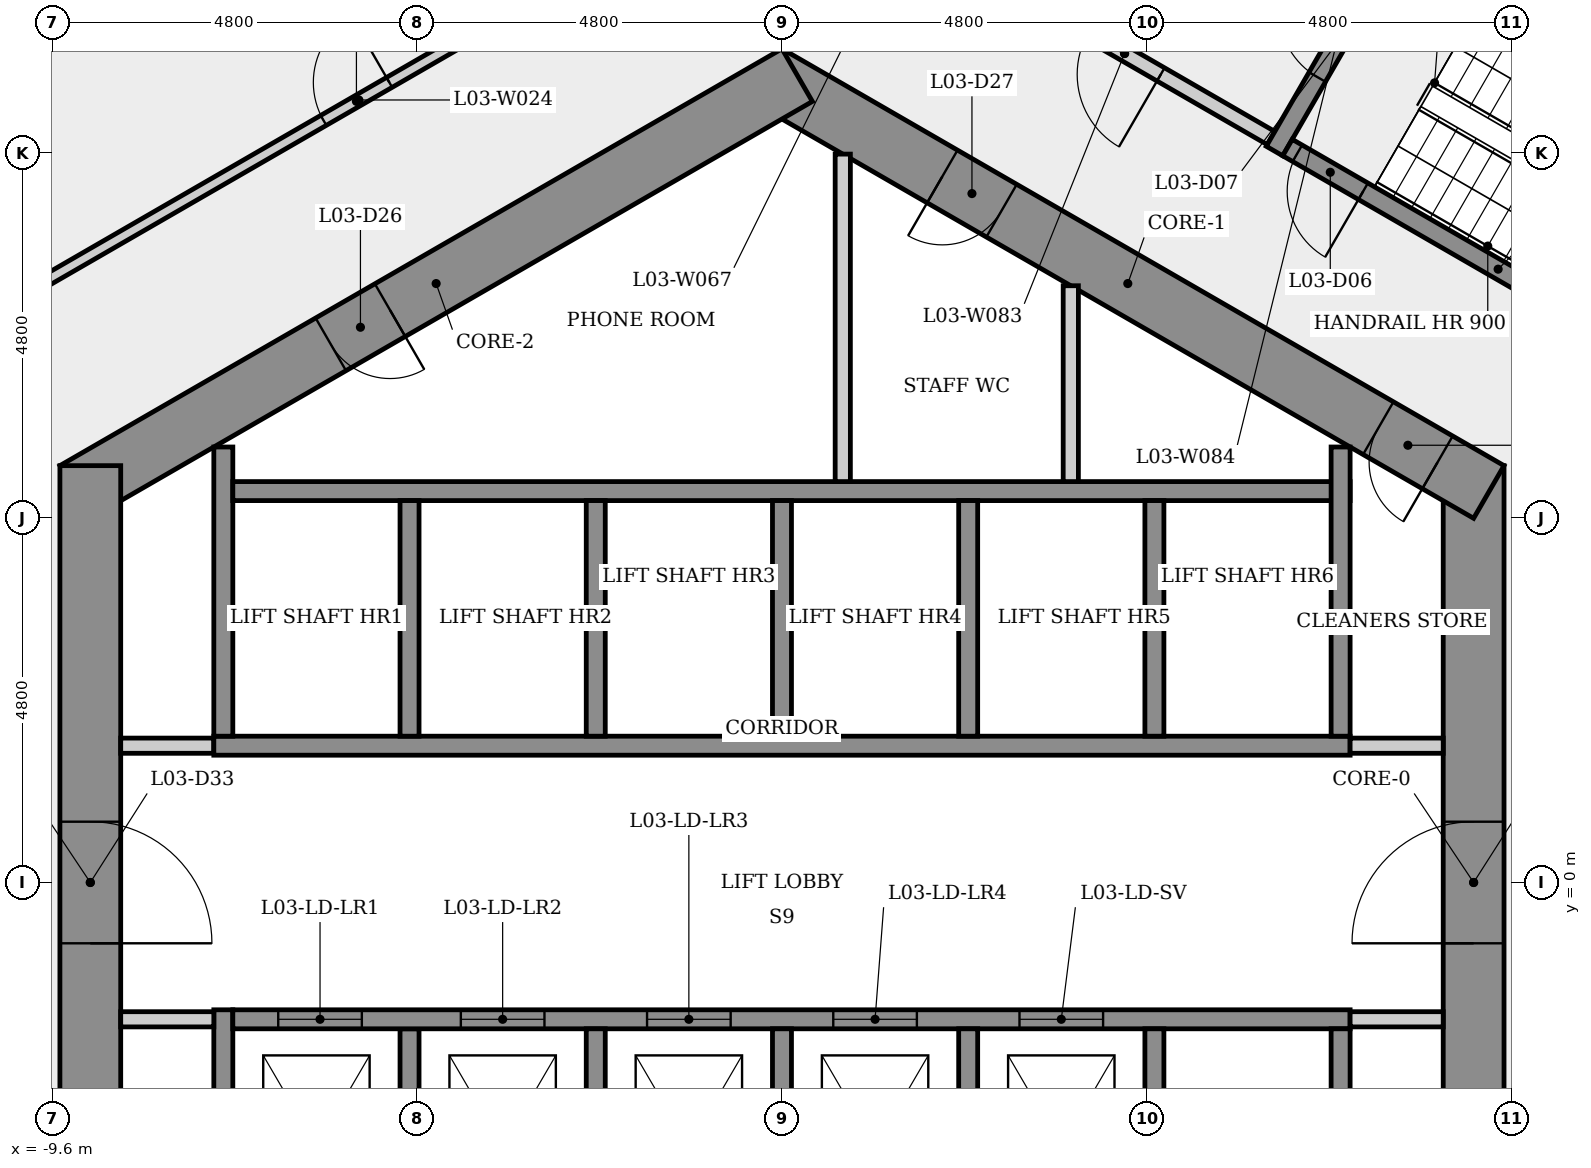
"""IFC4 building model, lengths in metres.
Left out: names, types, materials, properties, quantities, classifications, styles, units other than length and angle.
Written with IfcOpenShell. Run it as: python <this file> out.ifc"""

import sys

from ifc_helpers import new_model, si_unit, direction, frame, frame_2d, origin, place, context, subcontext, project, spatial, rectangle, extrude, element, fill, save


model = new_model("IFC4")
c1 = context("Model", 3, precision=1e-05, world=origin(), true_north=direction((0.0, 1.0)))
c2 = subcontext(c1, "Body", "Model", "MODEL_VIEW")
j1 = project(units=[si_unit("LENGTHUNIT", "METRE"), si_unit("PLANEANGLEUNIT", "RADIAN")], contexts=[c1])
p1 = place(None, origin())
s1 = spatial("IfcSite", under=j1, at=p1, CompositionType="ELEMENT")
p2 = place(p1, origin())
s2 = spatial("IfcBuilding", under=s1, at=p2, CompositionType="ELEMENT")
p3 = place(p2, frame((0.0, 0.0, 16.0)))
s3 = spatial("IfcBuildingStorey", under=s2, at=p3, CompositionType="ELEMENT", Elevation=16.0)
p4 = place(p3, frame((9.1, -5.485, 0.0), z_axis=(0.0, 0.0, 1.0), x_axis=(0.0, 1.0, 0.0)))
e1 = element("IfcWall", 1, at=p4, inside=s3, PredefinedType="SHEAR", context=c2, shape_type="SweptSolid", body=[
    extrude(rectangle(XDim=10.97, YDim=0.8, at=frame_2d((5.485, 0.0))), origin(), (0.0, 0.0, 1.0), 4.5),
])
p5 = place(p4, frame((4.685, 0.0, 0.0)))
e2 = element("IfcOpeningElement", 2, at=p5, cuts=e1, PredefinedType="OPENING", context=c2, shape_type="SweptSolid", body=[
    extrude(rectangle(XDim=1.6, YDim=2.1, at=frame_2d((0.8, 1.05))), frame((0.0, 0.41, 0.0), z_axis=(0.0, -1.0, 0.0), x_axis=(1.0, 0.0, 0.0)), (0.0, 0.0, 1.0), 0.82),
])
p6 = place(p3, frame((9.3, 5.138, 0.0), z_axis=(0.0, 0.0, 1.0), x_axis=(-0.866023993627, 0.500002442456, 0.0)))
e3 = element("IfcWall", 3, at=p6, inside=s3, PredefinedType="SHEAR", context=c2, shape_type="SweptSolid", body=[
    extrude(rectangle(XDim=10.97, YDim=0.8, at=frame_2d((5.485, 0.0))), origin(), (0.0, 0.0, 1.0), 4.5),
])
p7 = place(p6, frame((7.403, 0.0, 0.0)))
e4 = element("IfcOpeningElement", 4, at=p7, cuts=e3, PredefinedType="OPENING", context=c2, shape_type="SweptSolid", body=[
    extrude(rectangle(XDim=0.9, YDim=2.1, at=frame_2d((0.45, 1.05))), frame((0.0, 0.41, 0.0), z_axis=(0.0, -1.0, 0.0), x_axis=(1.0, 0.0, 0.0)), (0.0, 0.0, 1.0), 0.82),
])
p8 = place(p6, frame((0.78, 0.0, 0.0)))
e5 = element("IfcOpeningElement", 5, at=p8, cuts=e3, PredefinedType="OPENING", context=c2, shape_type="SweptSolid", body=[
    extrude(rectangle(XDim=0.9, YDim=2.1, at=frame_2d((0.45, 1.05))), frame((0.0, 0.41, 0.0), z_axis=(0.0, -1.0, 0.0), x_axis=(1.0, 0.0, 0.0)), (0.0, 0.0, 1.0), 0.82),
])
p9 = place(p3, frame((0.2, 10.623, 0.0), z_axis=(0.0, 0.0, 1.0), x_axis=(-0.866023993627, -0.500002442456, 0.0)))
e6 = element("IfcWall", 6, at=p9, inside=s3, PredefinedType="SHEAR", context=c2, shape_type="SweptSolid", body=[
    extrude(rectangle(XDim=10.97, YDim=0.8, at=frame_2d((5.485, 0.0))), origin(), (0.0, 0.0, 1.0), 4.5),
])
p10 = place(p9, frame((6.185, 0.0, 0.0)))
e7 = element("IfcOpeningElement", 7, at=p10, cuts=e6, PredefinedType="OPENING", context=c2, shape_type="SweptSolid", body=[
    extrude(rectangle(XDim=0.9, YDim=2.1, at=frame_2d((0.45, 1.05))), frame((0.0, 0.41, 0.0), z_axis=(0.0, -1.0, 0.0), x_axis=(1.0, 0.0, 0.0)), (0.0, 0.0, 1.0), 0.82),
])
p11 = place(p3, frame((-9.1, 5.485, 0.0), z_axis=(0.0, 0.0, 1.0), x_axis=(0.0, -1.0, 0.0)))
e8 = element("IfcWall", 8, at=p11, inside=s3, PredefinedType="SHEAR", context=c2, shape_type="SweptSolid", body=[
    extrude(rectangle(XDim=10.97, YDim=0.8, at=frame_2d((5.485, 0.0))), origin(), (0.0, 0.0, 1.0), 4.5),
])
p12 = place(p11, frame((4.685, 0.0, 0.0)))
e9 = element("IfcOpeningElement", 9, at=p12, cuts=e8, PredefinedType="OPENING", context=c2, shape_type="SweptSolid", body=[
    extrude(rectangle(XDim=1.6, YDim=2.1, at=frame_2d((0.8, 1.05))), frame((0.0, 0.41, 0.0), z_axis=(0.0, -1.0, 0.0), x_axis=(1.0, 0.0, 0.0)), (0.0, 0.0, 1.0), 0.82),
])
p13 = place(p3, frame((-10.598, 7.391, 0.0), z_axis=(0.0, 0.0, 1.0), x_axis=(0.866022183431, 0.500005577774, 0.0)))
e10 = element("IfcWall", 10, at=p13, inside=s3, PredefinedType="PARTITIONING", context=c2, shape_type="SweptSolid", body=[
    extrude(rectangle(XDim=11.619, YDim=0.15, at=frame_2d((5.81, 0.0))), origin(), (0.0, 0.0, 1.0), 4.05),
])
p14 = place(p13, frame((5.272, 0.0, 0.0)))
e11 = element("IfcOpeningElement", 11, at=p14, cuts=e10, PredefinedType="OPENING", context=c2, shape_type="SweptSolid", body=[
    extrude(rectangle(XDim=1.0, YDim=2.1, at=frame_2d((0.5, 1.05))), frame((0.0, 0.085, 0.0), z_axis=(0.0, -1.0, 0.0), x_axis=(1.0, 0.0, 0.0)), (0.0, 0.0, 1.0), 0.17),
])
p15 = place(p3, frame((-8.7, 1.8, 0.0), z_axis=(0.0, 0.0, 1.0), x_axis=(1.0, 0.0, 0.0)))
e12 = element("IfcWall", 12, at=p15, inside=s3, PredefinedType="PARTITIONING", context=c2, shape_type="SweptSolid", body=[
    extrude(rectangle(XDim=1.225, YDim=0.2, at=frame_2d((0.613, 0.0))), origin(), (0.0, 0.0, 1.0), 4.05),
])
p16 = place(p3, frame((-7.475, 1.8, 0.0), z_axis=(0.0, 0.0, 1.0), x_axis=(1.0, 0.0, 0.0)))
e13 = element("IfcWall", 13, at=p16, inside=s3, PredefinedType="SHEAR", context=c2, shape_type="SweptSolid", body=[
    extrude(rectangle(XDim=14.95, YDim=0.25, at=frame_2d((7.475, 0.0))), origin(), (0.0, 0.0, 1.0), 4.05),
])
p17 = place(p3, frame((-7.35, -5.73, 0.0), z_axis=(0.0, 0.0, 1.0), x_axis=(0.0, 1.0, 0.0)))
e14 = element("IfcWall", 14, at=p17, inside=s3, PredefinedType="SHEAR", context=c2, shape_type="SweptSolid", body=[
    extrude(rectangle(XDim=4.055, YDim=0.25, at=frame_2d((2.028, 0.0))), origin(), (0.0, 0.0, 1.0), 4.05),
])
p18 = place(p3, frame((-7.35, 1.925, 0.0), z_axis=(0.0, 0.0, 1.0), x_axis=(0.0, 1.0, 0.0)))
e15 = element("IfcWall", 15, at=p18, inside=s3, PredefinedType="SHEAR", context=c2, shape_type="SweptSolid", body=[
    extrude(rectangle(XDim=3.805, YDim=0.25, at=frame_2d((1.903, 0.0))), origin(), (0.0, 0.0, 1.0), 4.05),
])
p19 = place(p3, frame((-7.225, 5.15, 0.0), z_axis=(0.0, 0.0, 1.0), x_axis=(1.0, 0.0, 0.0)))
e16 = element("IfcWall", 16, at=p19, inside=s3, PredefinedType="SHEAR", context=c2, shape_type="SweptSolid", body=[
    extrude(rectangle(XDim=14.7, YDim=0.25, at=frame_2d((7.35, 0.0))), origin(), (0.0, 0.0, 1.0), 4.05),
])
p20 = place(p3, frame((-7.475, -1.8, 0.0), z_axis=(0.0, 0.0, 1.0), x_axis=(-1.0, 0.0, 0.0)))
e17 = element("IfcWall", 17, at=p20, inside=s3, PredefinedType="PARTITIONING", context=c2, shape_type="SweptSolid", body=[
    extrude(rectangle(XDim=1.225, YDim=0.2, at=frame_2d((0.613, 0.0))), origin(), (0.0, 0.0, 1.0), 4.05),
])
for number, where, z_axis, x_axis in (
    (18, (-4.9, -1.925, 0.0), (0.0, 0.0, 1.0), (0.0, -1.0, 0.0)),
    (19, (-4.9, 5.025, 0.0), (0.0, 0.0, 1.0), (0.0, -1.0, 0.0)),
):
    element("IfcWall", number, at=place(p3, frame(where, z_axis=z_axis, x_axis=x_axis)), inside=s3, PredefinedType="SHEAR", context=c2, shape_type="SweptSolid", body=[
        extrude(rectangle(XDim=3.1, YDim=0.25, at=frame_2d((1.55, 0.0))), origin(), (0.0, 0.0, 1.0), 4.5),
    ])
p21 = place(p3, frame((-7.225, -1.8, 0.0), z_axis=(0.0, 0.0, 1.0), x_axis=(1.0, 0.0, 0.0)))
e20 = element("IfcWall", 20, at=p21, inside=s3, PredefinedType="SHEAR", context=c2, shape_type="SweptSolid", body=[
    extrude(rectangle(XDim=14.7, YDim=0.25, at=frame_2d((7.35, 0.0))), origin(), (0.0, 0.0, 1.0), 4.05),
])
p22 = place(p21, frame((0.597, 0.0, 0.0)))
e21 = element("IfcOpeningElement", 21, at=p22, cuts=e20, PredefinedType="OPENING", context=c2, shape_type="SweptSolid", body=[
    extrude(rectangle(XDim=1.1, YDim=2.1, at=frame_2d((0.55, 1.05))), frame((0.0, 0.135, 0.0), z_axis=(0.0, -1.0, 0.0), x_axis=(1.0, 0.0, 0.0)), (0.0, 0.0, 1.0), 0.27),
])
p23 = place(p21, frame((3.0, 0.0, 0.0)))
e22 = element("IfcOpeningElement", 22, at=p23, cuts=e20, PredefinedType="OPENING", context=c2, shape_type="SweptSolid", body=[
    extrude(rectangle(XDim=1.1, YDim=2.1, at=frame_2d((0.55, 1.05))), frame((0.0, 0.135, 0.0), z_axis=(0.0, -1.0, 0.0), x_axis=(1.0, 0.0, 0.0)), (0.0, 0.0, 1.0), 0.27),
])
p24 = place(p21, frame((5.45, 0.0, 0.0)))
e23 = element("IfcOpeningElement", 23, at=p24, cuts=e20, PredefinedType="OPENING", context=c2, shape_type="SweptSolid", body=[
    extrude(rectangle(XDim=1.1, YDim=2.1, at=frame_2d((0.55, 1.05))), frame((0.0, 0.135, 0.0), z_axis=(0.0, -1.0, 0.0), x_axis=(1.0, 0.0, 0.0)), (0.0, 0.0, 1.0), 0.27),
])
p25 = place(p21, frame((7.9, 0.0, 0.0)))
e24 = element("IfcOpeningElement", 24, at=p25, cuts=e20, PredefinedType="OPENING", context=c2, shape_type="SweptSolid", body=[
    extrude(rectangle(XDim=1.1, YDim=2.1, at=frame_2d((0.55, 1.05))), frame((0.0, 0.135, 0.0), z_axis=(0.0, -1.0, 0.0), x_axis=(1.0, 0.0, 0.0)), (0.0, 0.0, 1.0), 0.27),
])
p26 = place(p21, frame((10.35, 0.0, 0.0)))
e25 = element("IfcOpeningElement", 25, at=p26, cuts=e20, PredefinedType="OPENING", context=c2, shape_type="SweptSolid", body=[
    extrude(rectangle(XDim=1.1, YDim=2.1, at=frame_2d((0.55, 1.05))), frame((0.0, 0.135, 0.0), z_axis=(0.0, -1.0, 0.0), x_axis=(1.0, 0.0, 0.0)), (0.0, 0.0, 1.0), 0.27),
])
for number, where, z_axis, x_axis in (
    (26, (-2.45, -1.925, 0.0), (0.0, 0.0, 1.0), (0.0, -1.0, 0.0)),
    (27, (-2.45, 5.025, 0.0), (0.0, 0.0, 1.0), (0.0, -1.0, 0.0)),
    (28, (0.0, -1.925, 0.0), (0.0, 0.0, 1.0), (0.0, -1.0, 0.0)),
    (29, (0.0, 5.025, 0.0), (0.0, 0.0, 1.0), (0.0, -1.0, 0.0)),
):
    element("IfcWall", number, at=place(p3, frame(where, z_axis=z_axis, x_axis=x_axis)), inside=s3, PredefinedType="SHEAR", context=c2, shape_type="SweptSolid", body=[
        extrude(rectangle(XDim=3.1, YDim=0.25, at=frame_2d((1.55, 0.0))), origin(), (0.0, 0.0, 1.0), 4.5),
    ])
p27 = place(p3, frame((0.8, 9.584, 0.0), z_axis=(0.0, 0.0, 1.0), x_axis=(0.0, -1.0, 0.0)))
e30 = element("IfcWall", 30, at=p27, inside=s3, PredefinedType="PARTITIONING", context=c2, shape_type="SweptSolid", body=[
    extrude(rectangle(XDim=4.309, YDim=0.2, at=frame_2d((2.155, 0.0))), origin(), (0.0, 0.0, 1.0), 4.05),
])
for number, where, z_axis, x_axis in (
    (31, (2.45, -1.925, 0.0), (0.0, 0.0, 1.0), (0.0, -1.0, 0.0)),
    (32, (2.45, 5.025, 0.0), (0.0, 0.0, 1.0), (0.0, -1.0, 0.0)),
):
    element("IfcWall", number, at=place(p3, frame(where, z_axis=z_axis, x_axis=x_axis)), inside=s3, PredefinedType="SHEAR", context=c2, shape_type="SweptSolid", body=[
        extrude(rectangle(XDim=3.1, YDim=0.25, at=frame_2d((1.55, 0.0))), origin(), (0.0, 0.0, 1.0), 4.5),
    ])
p28 = place(p3, frame((3.8, 7.852, 0.0), z_axis=(0.0, 0.0, 1.0), x_axis=(0.0, -1.0, 0.0)))
e33 = element("IfcWall", 33, at=p28, inside=s3, PredefinedType="PARTITIONING", context=c2, shape_type="SweptSolid", body=[
    extrude(rectangle(XDim=2.577, YDim=0.2, at=frame_2d((1.289, 0.0))), origin(), (0.0, 0.0, 1.0), 4.05),
])
for number, where, z_axis, x_axis in (
    (34, (4.9, -1.925, 0.0), (0.0, 0.0, 1.0), (0.0, -1.0, 0.0)),
    (35, (4.9, 5.025, 0.0), (0.0, 0.0, 1.0), (0.0, -1.0, 0.0)),
):
    element("IfcWall", number, at=place(p3, frame(where, z_axis=z_axis, x_axis=x_axis)), inside=s3, PredefinedType="SHEAR", context=c2, shape_type="SweptSolid", body=[
        extrude(rectangle(XDim=3.1, YDim=0.25, at=frame_2d((1.55, 0.0))), origin(), (0.0, 0.0, 1.0), 4.5),
    ])
p29 = place(p3, frame((6.435, 9.795, 0.0), z_axis=(0.0, 0.0, 1.0), x_axis=(-0.866012907634, 0.500021643343, 0.0)))
e36 = element("IfcWall", 36, at=p29, inside=s3, PredefinedType="PARTITIONING", context=c2, shape_type="SweptSolid", body=[
    extrude(rectangle(XDim=4.45, YDim=0.2, at=frame_2d((2.225, 0.0))), origin(), (0.0, 0.0, 1.0), 4.05),
])
p30 = place(p29, frame((1.675, 0.0, 0.0)))
e37 = element("IfcOpeningElement", 37, at=p30, cuts=e36, PredefinedType="OPENING", context=c2, shape_type="SweptSolid", body=[
    extrude(rectangle(XDim=1.1, YDim=2.1, at=frame_2d((0.55, 1.05))), frame((0.0, 0.11, 0.0), z_axis=(0.0, -1.0, 0.0), x_axis=(1.0, 0.0, 0.0)), (0.0, 0.0, 1.0), 0.22),
])
p31 = place(p3, frame((6.48, 9.624, 0.0), z_axis=(0.0, 0.0, 1.0), x_axis=(0.500017246033, 0.866015446554, 0.0)))
e38 = element("IfcWall", 38, at=p31, inside=s3, PredefinedType="SHEAR", context=c2, shape_type="SweptSolid", body=[
    extrude(rectangle(XDim=3.25, YDim=0.25, at=frame_2d((1.625, 0.0))), origin(), (0.0, 0.0, 1.0), 4.05),
])
p32 = place(p31, frame((1.125, 0.0, 0.0)))
e39 = element("IfcOpeningElement", 39, at=p32, cuts=e38, PredefinedType="OPENING", context=c2, shape_type="SweptSolid", body=[
    extrude(rectangle(XDim=1.0, YDim=2.1, at=frame_2d((0.5, 1.05))), frame((0.0, 0.135, 0.0), z_axis=(0.0, -1.0, 0.0), x_axis=(1.0, 0.0, 0.0)), (0.0, 0.0, 1.0), 0.27),
])
p33 = place(p3, frame((7.475, 1.8, 0.0), z_axis=(0.0, 0.0, 1.0), x_axis=(1.0, 0.0, 0.0)))
e40 = element("IfcWall", 40, at=p33, inside=s3, PredefinedType="PARTITIONING", context=c2, shape_type="SweptSolid", body=[
    extrude(rectangle(XDim=1.225, YDim=0.2, at=frame_2d((0.613, 0.0))), origin(), (0.0, 0.0, 1.0), 4.05),
])
for number, where, z_axis, x_axis in (
    (41, (7.35, -1.925, 0.0), (0.0, 0.0, 1.0), (0.0, -1.0, 0.0)),
    (42, (7.35, 5.73, 0.0), (0.0, 0.0, 1.0), (0.0, -1.0, 0.0)),
):
    element("IfcWall", number, at=place(p3, frame(where, z_axis=z_axis, x_axis=x_axis)), inside=s3, PredefinedType="SHEAR", context=c2, shape_type="SweptSolid", body=[
        extrude(rectangle(XDim=3.805, YDim=0.25, at=frame_2d((1.903, 0.0))), origin(), (0.0, 0.0, 1.0), 4.05),
    ])
p34 = place(p3, frame((8.151, 12.268, 0.0), z_axis=(0.0, 0.0, 1.0), x_axis=(0.866025499775, -0.499999833739, 0.0)))
e43 = element("IfcWall", 43, at=p34, inside=s3, PredefinedType="SHEAR", context=c2, shape_type="SweptSolid", body=[
    extrude(rectangle(XDim=6.4, YDim=0.25, at=frame_2d((3.2, 0.0))), origin(), (0.0, 0.0, 1.0), 4.05),
])
p35 = place(p3, frame((8.7, -1.8, 0.0), z_axis=(0.0, 0.0, 1.0), x_axis=(-1.0, 0.0, 0.0)))
e44 = element("IfcWall", 44, at=p35, inside=s3, PredefinedType="PARTITIONING", context=c2, shape_type="SweptSolid", body=[
    extrude(rectangle(XDim=1.225, YDim=0.2, at=frame_2d((0.613, 0.0))), origin(), (0.0, 0.0, 1.0), 4.05),
])
p36 = place(p3, frame((12.194, 6.47, 0.0), z_axis=(0.0, 0.0, 1.0), x_axis=(-0.866025499775, 0.499999833739, 0.0)))
e45 = element("IfcWall", 45, at=p36, inside=s3, PredefinedType="SHEAR", context=c2, shape_type="SweptSolid", body=[
    extrude(rectangle(XDim=6.4, YDim=0.25, at=frame_2d((3.2, 0.0))), origin(), (0.0, 0.0, 1.0), 4.05),
])
p37 = place(p36, frame((5.25, 0.0, 0.0)))
e46 = element("IfcOpeningElement", 46, at=p37, cuts=e45, PredefinedType="OPENING", context=c2, shape_type="SweptSolid", body=[
    extrude(rectangle(XDim=1.0, YDim=2.1, at=frame_2d((0.5, 1.05))), frame((0.0, 0.135, 0.0), z_axis=(0.0, -1.0, 0.0), x_axis=(1.0, 0.0, 0.0)), (0.0, 0.0, 1.0), 0.27),
])
p38 = place(p22, origin())
e47 = element("IfcDoor", 47, at=p38, inside=s3, OperationType="SLIDING_TO_LEFT", PredefinedType="DOOR", context=c2, shape_type="SweptSolid", body=[
    extrude(rectangle(XDim=1.1, YDim=2.1, at=frame_2d((0.55, 1.05))), frame((0.0, 0.025, 0.0), z_axis=(0.0, -1.0, 0.0), x_axis=(1.0, 0.0, 0.0)), (0.0, 0.0, 1.0), 0.05),
])
fill(e21, e47)
p39 = place(p23, origin())
e48 = element("IfcDoor", 48, at=p39, inside=s3, OperationType="SLIDING_TO_LEFT", PredefinedType="DOOR", context=c2, shape_type="SweptSolid", body=[
    extrude(rectangle(XDim=1.1, YDim=2.1, at=frame_2d((0.55, 1.05))), frame((0.0, 0.025, 0.0), z_axis=(0.0, -1.0, 0.0), x_axis=(1.0, 0.0, 0.0)), (0.0, 0.0, 1.0), 0.05),
])
fill(e22, e48)
p40 = place(p24, origin())
e49 = element("IfcDoor", 49, at=p40, inside=s3, OperationType="SLIDING_TO_LEFT", PredefinedType="DOOR", context=c2, shape_type="SweptSolid", body=[
    extrude(rectangle(XDim=1.1, YDim=2.1, at=frame_2d((0.55, 1.05))), frame((0.0, 0.025, 0.0), z_axis=(0.0, -1.0, 0.0), x_axis=(1.0, 0.0, 0.0)), (0.0, 0.0, 1.0), 0.05),
])
fill(e23, e49)
p41 = place(p25, origin())
e50 = element("IfcDoor", 50, at=p41, inside=s3, OperationType="SLIDING_TO_LEFT", PredefinedType="DOOR", context=c2, shape_type="SweptSolid", body=[
    extrude(rectangle(XDim=1.1, YDim=2.1, at=frame_2d((0.55, 1.05))), frame((0.0, 0.025, 0.0), z_axis=(0.0, -1.0, 0.0), x_axis=(1.0, 0.0, 0.0)), (0.0, 0.0, 1.0), 0.05),
])
fill(e24, e50)
p42 = place(p26, origin())
e51 = element("IfcDoor", 51, at=p42, inside=s3, OperationType="SLIDING_TO_LEFT", PredefinedType="DOOR", context=c2, shape_type="SweptSolid", body=[
    extrude(rectangle(XDim=1.1, YDim=2.1, at=frame_2d((0.55, 1.05))), frame((0.0, 0.025, 0.0), z_axis=(0.0, -1.0, 0.0), x_axis=(1.0, 0.0, 0.0)), (0.0, 0.0, 1.0), 0.05),
])
fill(e25, e51)
p43 = place(p37, origin())
e52 = element("IfcDoor", 52, at=p43, inside=s3, OperationType="SINGLE_SWING_LEFT", PredefinedType="DOOR", context=c2, shape_type="SweptSolid", body=[
    extrude(rectangle(XDim=1.0, YDim=2.1, at=frame_2d((0.5, 1.05))), frame((0.0, 0.025, 0.0), z_axis=(0.0, -1.0, 0.0), x_axis=(1.0, 0.0, 0.0)), (0.0, 0.0, 1.0), 0.05),
])
fill(e46, e52)
p44 = place(p32, origin())
e53 = element("IfcDoor", 53, at=p44, inside=s3, OperationType="SINGLE_SWING_RIGHT", PredefinedType="DOOR", context=c2, shape_type="SweptSolid", body=[
    extrude(rectangle(XDim=1.0, YDim=2.1, at=frame_2d((0.5, 1.05))), frame((0.0, 0.025, 0.0), z_axis=(0.0, -1.0, 0.0), x_axis=(1.0, 0.0, 0.0)), (0.0, 0.0, 1.0), 0.05),
])
fill(e39, e53)
p45 = place(p30, origin())
e54 = element("IfcDoor", 54, at=p45, inside=s3, OperationType="SINGLE_SWING_LEFT", PredefinedType="DOOR", context=c2, shape_type="SweptSolid", body=[
    extrude(rectangle(XDim=1.1, YDim=2.1, at=frame_2d((0.55, 1.05))), frame((0.0, 0.025, 0.0), z_axis=(0.0, -1.0, 0.0), x_axis=(1.0, 0.0, 0.0)), (0.0, 0.0, 1.0), 0.05),
])
fill(e37, e54)
p46 = place(p14, origin())
e55 = element("IfcDoor", 55, at=p46, inside=s3, OperationType="SINGLE_SWING_RIGHT", PredefinedType="DOOR", context=c2, shape_type="SweptSolid", body=[
    extrude(rectangle(XDim=1.0, YDim=2.1, at=frame_2d((0.5, 1.05))), frame((0.0, 0.025, 0.0), z_axis=(0.0, -1.0, 0.0), x_axis=(1.0, 0.0, 0.0)), (0.0, 0.0, 1.0), 0.05),
])
fill(e11, e55)
p47 = place(p10, origin())
e56 = element("IfcDoor", 56, at=p47, inside=s3, OperationType="SINGLE_SWING_LEFT", PredefinedType="DOOR", context=c2, shape_type="SweptSolid", body=[
    extrude(rectangle(XDim=0.9, YDim=2.1, at=frame_2d((0.45, 1.05))), frame((0.0, 0.025, 0.0), z_axis=(0.0, -1.0, 0.0), x_axis=(1.0, 0.0, 0.0)), (0.0, 0.0, 1.0), 0.05),
])
fill(e7, e56)
p48 = place(p7, origin())
e57 = element("IfcDoor", 57, at=p48, inside=s3, OperationType="SINGLE_SWING_RIGHT", PredefinedType="DOOR", context=c2, shape_type="SweptSolid", body=[
    extrude(rectangle(XDim=0.9, YDim=2.1, at=frame_2d((0.45, 1.05))), frame((0.0, 0.025, 0.0), z_axis=(0.0, -1.0, 0.0), x_axis=(1.0, 0.0, 0.0)), (0.0, 0.0, 1.0), 0.05),
])
fill(e4, e57)
p49 = place(p8, origin())
e58 = element("IfcDoor", 58, at=p49, inside=s3, OperationType="SINGLE_SWING_LEFT", PredefinedType="DOOR", context=c2, shape_type="SweptSolid", body=[
    extrude(rectangle(XDim=0.9, YDim=2.1, at=frame_2d((0.45, 1.05))), frame((0.0, 0.025, 0.0), z_axis=(0.0, -1.0, 0.0), x_axis=(1.0, 0.0, 0.0)), (0.0, 0.0, 1.0), 0.05),
])
fill(e5, e58)
p50 = place(p5, origin())
e59 = element("IfcDoor", 59, at=p50, inside=s3, OperationType="SINGLE_SWING_LEFT", PredefinedType="DOOR", context=c2, shape_type="SweptSolid", body=[
    extrude(rectangle(XDim=1.6, YDim=2.1, at=frame_2d((0.8, 1.05))), frame((0.0, 0.025, 0.0), z_axis=(0.0, -1.0, 0.0), x_axis=(1.0, 0.0, 0.0)), (0.0, 0.0, 1.0), 0.05),
])
fill(e2, e59)
p51 = place(p12, origin())
e60 = element("IfcDoor", 60, at=p51, inside=s3, OperationType="SINGLE_SWING_RIGHT", PredefinedType="DOOR", context=c2, shape_type="SweptSolid", body=[
    extrude(rectangle(XDim=1.6, YDim=2.1, at=frame_2d((0.8, 1.05))), frame((0.0, 0.025, 0.0), z_axis=(0.0, -1.0, 0.0), x_axis=(1.0, 0.0, 0.0)), (0.0, 0.0, 1.0), 0.05),
])
fill(e9, e60)
save(model, sys.argv[1])
